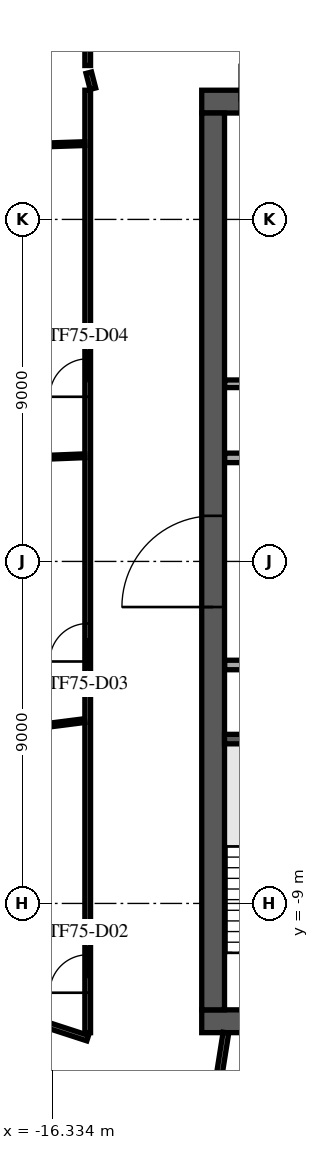
"""IFC4 building model, lengths in metres.
Left out: names, types, materials, properties, quantities, classifications, styles, units other than length and angle.
Written with IfcOpenShell. Run it as: python <this file> out.ifc"""

import sys

from ifc_helpers import new_model, si_unit, direction, frame, frame_2d, origin, place, context, subcontext, project, spatial, rectangle, extrude, element, fill, save


model = new_model("IFC4")
c1 = context("Model", 3, precision=1e-05, world=origin(), true_north=direction((0.0, 1.0)))
c2 = subcontext(c1, "Body", "Model", "MODEL_VIEW")
j1 = project(units=[si_unit("LENGTHUNIT", "METRE"), si_unit("PLANEANGLEUNIT", "RADIAN")], contexts=[c1])
p1 = place(None, origin())
s1 = spatial("IfcSite", under=j1, at=p1, CompositionType="ELEMENT")
p2 = place(p1, origin())
s2 = spatial("IfcBuilding", under=s1, at=p2, CompositionType="ELEMENT")
p3 = place(p2, frame((0.0, 0.0, 316.5)))
s3 = spatial("IfcBuildingStorey", under=s2, at=p3, CompositionType="ELEMENT", Elevation=316.5)
p4 = place(p3, frame((-12.4, 12.1, 0.0), z_axis=(0.0, 0.0, 1.0), x_axis=(1.0, 0.0, 0.0)))
e1 = element("IfcWall", 1, at=p4, inside=s3, PredefinedType="SHEAR", context=c2, shape_type="SweptSolid", body=[
    extrude(rectangle(XDim=24.8, YDim=0.6, at=frame_2d((12.4, 0.0))), origin(), (0.0, 0.0, 1.0), 3.65),
])
p5 = place(p4, frame((11.2, 0.0, 0.0)))
e2 = element("IfcOpeningElement", 2, at=p5, cuts=e1, PredefinedType="OPENING", context=c2, shape_type="SweptSolid", body=[
    extrude(rectangle(XDim=2.4, YDim=2.4, at=frame_2d((1.2, 1.2))), frame((0.0, 0.31, 0.0), z_axis=(0.0, -1.0, 0.0), x_axis=(1.0, 0.0, 0.0)), (0.0, 0.0, 1.0), 0.62),
])
p6 = place(p4, frame((22.025, 0.0, 0.0)))
e3 = element("IfcOpeningElement", 3, at=p6, cuts=e1, PredefinedType="OPENING", context=c2, shape_type="SweptSolid", body=[
    extrude(rectangle(XDim=1.2, YDim=2.1, at=frame_2d((0.6, 1.05))), frame((0.0, 0.31, 0.0), z_axis=(0.0, -1.0, 0.0), x_axis=(1.0, 0.0, 0.0)), (0.0, 0.0, 1.0), 0.62),
])
p7 = place(p4, frame((1.0, 0.0, 0.0)))
e4 = element("IfcOpeningElement", 4, at=p7, cuts=e1, PredefinedType="OPENING", context=c2, shape_type="SweptSolid", body=[
    extrude(rectangle(XDim=1.0, YDim=2.1, at=frame_2d((0.5, 1.05))), frame((0.0, 0.31, 0.0), z_axis=(0.0, -1.0, 0.0), x_axis=(1.0, 0.0, 0.0)), (0.0, 0.0, 1.0), 0.62),
])
p8 = place(p3, frame((-12.4, -12.1, 0.0), z_axis=(0.0, 0.0, 1.0), x_axis=(1.0, 0.0, 0.0)))
e5 = element("IfcWall", 5, at=p8, inside=s3, PredefinedType="SHEAR", context=c2, shape_type="SweptSolid", body=[
    extrude(rectangle(XDim=24.8, YDim=0.6, at=frame_2d((12.4, 0.0))), origin(), (0.0, 0.0, 1.0), 3.65),
])
p9 = place(p8, frame((7.3, 0.0, 0.0)))
e6 = element("IfcOpeningElement", 6, at=p9, cuts=e5, PredefinedType="OPENING", context=c2, shape_type="SweptSolid", body=[
    extrude(rectangle(XDim=2.0, YDim=2.1, at=frame_2d((1.0, 1.05))), frame((0.0, 0.31, 0.0), z_axis=(0.0, -1.0, 0.0), x_axis=(1.0, 0.0, 0.0)), (0.0, 0.0, 1.0), 0.62),
])
p10 = place(p8, frame((17.425, 0.0, 0.0)))
e7 = element("IfcOpeningElement", 7, at=p10, cuts=e5, PredefinedType="OPENING", context=c2, shape_type="SweptSolid", body=[
    extrude(rectangle(XDim=1.2, YDim=2.1, at=frame_2d((0.6, 1.05))), frame((0.0, 0.31, 0.0), z_axis=(0.0, -1.0, 0.0), x_axis=(1.0, 0.0, 0.0)), (0.0, 0.0, 1.0), 0.62),
])
p11 = place(p8, frame((1.575, 0.0, 0.0)))
e8 = element("IfcOpeningElement", 8, at=p11, cuts=e5, PredefinedType="OPENING", context=c2, shape_type="SweptSolid", body=[
    extrude(rectangle(XDim=1.2, YDim=2.1, at=frame_2d((0.6, 1.05))), frame((0.0, 0.31, 0.0), z_axis=(0.0, -1.0, 0.0), x_axis=(1.0, 0.0, 0.0)), (0.0, 0.0, 1.0), 0.62),
])
p12 = place(p8, frame((22.025, 0.0, 0.0)))
e9 = element("IfcOpeningElement", 9, at=p12, cuts=e5, PredefinedType="OPENING", context=c2, shape_type="SweptSolid", body=[
    extrude(rectangle(XDim=1.2, YDim=2.1, at=frame_2d((0.6, 1.05))), frame((0.0, 0.31, 0.0), z_axis=(0.0, -1.0, 0.0), x_axis=(1.0, 0.0, 0.0)), (0.0, 0.0, 1.0), 0.62),
])
p13 = place(p3, frame((-12.1, -11.8, 0.0), z_axis=(0.0, 0.0, 1.0), x_axis=(0.0, 1.0, 0.0)))
e10 = element("IfcWall", 10, at=p13, inside=s3, PredefinedType="SHEAR", context=c2, shape_type="SweptSolid", body=[
    extrude(rectangle(XDim=23.6, YDim=0.6, at=frame_2d((11.8, 0.0))), origin(), (0.0, 0.0, 1.0), 3.65),
])
p14 = place(p13, frame((10.6, 0.0, 0.0)))
e11 = element("IfcOpeningElement", 11, at=p14, cuts=e10, PredefinedType="OPENING", context=c2, shape_type="SweptSolid", body=[
    extrude(rectangle(XDim=2.4, YDim=2.4, at=frame_2d((1.2, 1.2))), frame((0.0, 0.31, 0.0), z_axis=(0.0, -1.0, 0.0), x_axis=(1.0, 0.0, 0.0)), (0.0, 0.0, 1.0), 0.62),
])
p15 = place(p3, frame((-8.65, -4.675, 0.0), z_axis=(0.0, 0.0, 1.0), x_axis=(-1.0, 0.0, 0.0)))
e12 = element("IfcWall", 12, at=p15, inside=s3, PredefinedType="SOLIDWALL", context=c2, shape_type="SweptSolid", body=[
    extrude(rectangle(XDim=3.15, YDim=0.25, at=frame_2d((1.575, 0.0))), origin(), (0.0, 0.0, 1.0), 3.65),
])
p16 = place(p3, frame((-11.795, -2.725, 0.0), z_axis=(0.0, 0.0, 1.0), x_axis=(1.0, 0.0, 0.0)))
e13 = element("IfcWall", 13, at=p16, inside=s3, PredefinedType="PARTITIONING", context=c2, shape_type="SweptSolid", body=[
    extrude(rectangle(XDim=14.415, YDim=0.25, at=frame_2d((7.208, 0.0))), origin(), (0.0, 0.0, 1.0), 3.65),
])
p17 = place(p16, frame((1.295, 0.0, 0.0)))
e14 = element("IfcOpeningElement", 14, at=p17, cuts=e13, PredefinedType="OPENING", context=c2, shape_type="SweptSolid", body=[
    extrude(rectangle(XDim=1.0, YDim=2.1, at=frame_2d((0.5, 1.05))), frame((0.0, 0.135, 0.0), z_axis=(0.0, -1.0, 0.0), x_axis=(1.0, 0.0, 0.0)), (0.0, 0.0, 1.0), 0.27),
])
p18 = place(p16, frame((4.42, 0.0, 0.0)))
e15 = element("IfcOpeningElement", 15, at=p18, cuts=e13, PredefinedType="OPENING", context=c2, shape_type="SweptSolid", body=[
    extrude(rectangle(XDim=1.0, YDim=2.1, at=frame_2d((0.5, 1.05))), frame((0.0, 0.135, 0.0), z_axis=(0.0, -1.0, 0.0), x_axis=(1.0, 0.0, 0.0)), (0.0, 0.0, 1.0), 0.27),
])
p19 = place(p16, frame((9.92, 0.0, 0.0)))
e16 = element("IfcOpeningElement", 16, at=p19, cuts=e13, PredefinedType="OPENING", context=c2, shape_type="SweptSolid", body=[
    extrude(rectangle(XDim=1.0, YDim=2.1, at=frame_2d((0.5, 1.05))), frame((0.0, 0.135, 0.0), z_axis=(0.0, -1.0, 0.0), x_axis=(1.0, 0.0, 0.0)), (0.0, 0.0, 1.0), 0.27),
])
p20 = place(p3, frame((-11.795, 2.725, 0.0), z_axis=(0.0, 0.0, 1.0), x_axis=(1.0, 0.0, 0.0)))
e17 = element("IfcWall", 17, at=p20, inside=s3, PredefinedType="PARTITIONING", context=c2, shape_type="SweptSolid", body=[
    extrude(rectangle(XDim=23.59, YDim=0.25, at=frame_2d((11.795, 0.0))), origin(), (0.0, 0.0, 1.0), 3.65),
])
p21 = place(p20, frame((21.345, 0.0, 0.0)))
e18 = element("IfcOpeningElement", 18, at=p21, cuts=e17, PredefinedType="OPENING", context=c2, shape_type="SweptSolid", body=[
    extrude(rectangle(XDim=0.9, YDim=2.1, at=frame_2d((0.45, 1.05))), frame((0.0, 0.135, 0.0), z_axis=(0.0, -1.0, 0.0), x_axis=(1.0, 0.0, 0.0)), (0.0, 0.0, 1.0), 0.27),
])
p22 = place(p20, frame((1.345, 0.0, 0.0)))
e19 = element("IfcOpeningElement", 19, at=p22, cuts=e17, PredefinedType="OPENING", context=c2, shape_type="SweptSolid", body=[
    extrude(rectangle(XDim=0.9, YDim=2.1, at=frame_2d((0.45, 1.05))), frame((0.0, 0.135, 0.0), z_axis=(0.0, -1.0, 0.0), x_axis=(1.0, 0.0, 0.0)), (0.0, 0.0, 1.0), 0.27),
])
p23 = place(p20, frame((4.42, 0.0, 0.0)))
e20 = element("IfcOpeningElement", 20, at=p23, cuts=e17, PredefinedType="OPENING", context=c2, shape_type="SweptSolid", body=[
    extrude(rectangle(XDim=1.0, YDim=2.1, at=frame_2d((0.5, 1.05))), frame((0.0, 0.135, 0.0), z_axis=(0.0, -1.0, 0.0), x_axis=(1.0, 0.0, 0.0)), (0.0, 0.0, 1.0), 0.27),
])
p24 = place(p20, frame((7.17, 0.0, 0.0)))
e21 = element("IfcOpeningElement", 21, at=p24, cuts=e17, PredefinedType="OPENING", context=c2, shape_type="SweptSolid", body=[
    extrude(rectangle(XDim=1.0, YDim=2.1, at=frame_2d((0.5, 1.05))), frame((0.0, 0.135, 0.0), z_axis=(0.0, -1.0, 0.0), x_axis=(1.0, 0.0, 0.0)), (0.0, 0.0, 1.0), 0.27),
])
p25 = place(p20, frame((12.57, 0.0, 0.0)))
e22 = element("IfcOpeningElement", 22, at=p25, cuts=e17, PredefinedType="OPENING", context=c2, shape_type="SweptSolid", body=[
    extrude(rectangle(XDim=1.2, YDim=2.1, at=frame_2d((0.6, 1.05))), frame((0.0, 0.135, 0.0), z_axis=(0.0, -1.0, 0.0), x_axis=(1.0, 0.0, 0.0)), (0.0, 0.0, 1.0), 0.27),
])
p26 = place(p3, frame((-11.795, 4.675, 0.0), z_axis=(0.0, 0.0, 1.0), x_axis=(1.0, 0.0, 0.0)))
e23 = element("IfcWall", 23, at=p26, inside=s3, PredefinedType="PARTITIONING", context=c2, shape_type="SweptSolid", body=[
    extrude(rectangle(XDim=3.645, YDim=0.2, at=frame_2d((1.823, 0.0))), origin(), (0.0, 0.0, 1.0), 3.65),
])
p27 = place(p3, frame((-22.763, -12.676, 0.0), z_axis=(0.0, 0.0, 1.0), x_axis=(0.951055018443, -0.309021604252, 0.0)))
e24 = element("IfcWall", 24, at=p27, inside=s3, PredefinedType="PARTITIONING", context=c2, shape_type="SweptSolid", body=[
    extrude(rectangle(XDim=35.537, YDim=0.15, at=frame_2d((17.769, 0.0))), origin(), (0.0, 0.0, 1.0), 3.25),
])
p28 = place(p27, frame((0.8, 0.0, 0.0)))
e25 = element("IfcOpeningElement", 25, at=p28, cuts=e24, PredefinedType="OPENING", context=c2, shape_type="SweptSolid", body=[
    extrude(rectangle(XDim=1.8, YDim=2.1, at=frame_2d((0.9, 1.05))), frame((0.0, 0.085, 0.0), z_axis=(0.0, -1.0, 0.0), x_axis=(1.0, 0.0, 0.0)), (0.0, 0.0, 1.0), 0.17),
])
p29 = place(p27, frame((9.098, 0.0, 0.0)))
e26 = element("IfcOpeningElement", 26, at=p29, cuts=e24, PredefinedType="OPENING", context=c2, shape_type="SweptSolid", body=[
    extrude(rectangle(XDim=1.0, YDim=2.1, at=frame_2d((0.5, 1.05))), frame((0.0, 0.085, 0.0), z_axis=(0.0, -1.0, 0.0), x_axis=(1.0, 0.0, 0.0)), (0.0, 0.0, 1.0), 0.17),
])
p30 = place(p27, frame((17.589, 0.0, 0.0)))
e27 = element("IfcOpeningElement", 27, at=p30, cuts=e24, PredefinedType="OPENING", context=c2, shape_type="SweptSolid", body=[
    extrude(rectangle(XDim=1.0, YDim=2.1, at=frame_2d((0.5, 1.05))), frame((0.0, 0.085, 0.0), z_axis=(0.0, -1.0, 0.0), x_axis=(1.0, 0.0, 0.0)), (0.0, 0.0, 1.0), 0.17),
])
p31 = place(p27, frame((27.473, 0.0, 0.0)))
e28 = element("IfcOpeningElement", 28, at=p31, cuts=e24, PredefinedType="OPENING", context=c2, shape_type="SweptSolid", body=[
    extrude(rectangle(XDim=1.0, YDim=2.1, at=frame_2d((0.5, 1.05))), frame((0.0, 0.085, 0.0), z_axis=(0.0, -1.0, 0.0), x_axis=(1.0, 0.0, 0.0)), (0.0, 0.0, 1.0), 0.17),
])
p32 = place(p27, frame((30.83, 0.0, 0.0)))
e29 = element("IfcOpeningElement", 29, at=p32, cuts=e24, PredefinedType="OPENING", context=c2, shape_type="SweptSolid", body=[
    extrude(rectangle(XDim=1.8, YDim=2.1, at=frame_2d((0.9, 1.05))), frame((0.0, 0.085, 0.0), z_axis=(0.0, -1.0, 0.0), x_axis=(1.0, 0.0, 0.0)), (0.0, 0.0, 1.0), 0.17),
])
p33 = place(p3, frame((-22.021, -10.394, 0.0), z_axis=(0.0, 0.0, 1.0), x_axis=(0.951082252119, -0.308937776427, 0.0)))
e30 = element("IfcWall", 30, at=p33, inside=s3, PredefinedType="PARTITIONING", context=c2, shape_type="SweptSolid", body=[
    extrude(rectangle(XDim=6.961, YDim=0.15, at=frame_2d((3.481, 0.0))), origin(), (0.0, 0.0, 1.0), 3.25),
])
p34 = place(p3, frame((-15.4, -12.4, 0.0), z_axis=(0.0, 0.0, 1.0), x_axis=(0.0, 1.0, 0.0)))
e31 = element("IfcWall", 31, at=p34, inside=s3, PredefinedType="PARTITIONING", context=c2, shape_type="SweptSolid", body=[
    extrude(rectangle(XDim=24.8, YDim=0.15, at=frame_2d((12.4, 0.0))), origin(), (0.0, 0.0, 1.0), 3.25),
])
p35 = place(p34, frame((1.05, 0.0, 0.0)))
e32 = element("IfcOpeningElement", 32, at=p35, cuts=e31, PredefinedType="OPENING", context=c2, shape_type="SweptSolid", body=[
    extrude(rectangle(XDim=1.0, YDim=2.1, at=frame_2d((0.5, 1.05))), frame((0.0, 0.085, 0.0), z_axis=(0.0, -1.0, 0.0), x_axis=(1.0, 0.0, 0.0)), (0.0, 0.0, 1.0), 0.17),
])
p36 = place(p34, frame((9.767, 0.0, 0.0)))
e33 = element("IfcOpeningElement", 33, at=p36, cuts=e31, PredefinedType="OPENING", context=c2, shape_type="SweptSolid", body=[
    extrude(rectangle(XDim=1.0, YDim=2.1, at=frame_2d((0.5, 1.05))), frame((0.0, 0.085, 0.0), z_axis=(0.0, -1.0, 0.0), x_axis=(1.0, 0.0, 0.0)), (0.0, 0.0, 1.0), 0.17),
])
p37 = place(p34, frame((16.733, 0.0, 0.0)))
e34 = element("IfcOpeningElement", 34, at=p37, cuts=e31, PredefinedType="OPENING", context=c2, shape_type="SweptSolid", body=[
    extrude(rectangle(XDim=1.0, YDim=2.1, at=frame_2d((0.5, 1.05))), frame((0.0, 0.085, 0.0), z_axis=(0.0, -1.0, 0.0), x_axis=(1.0, 0.0, 0.0)), (0.0, 0.0, 1.0), 0.17),
])
p38 = place(p3, frame((-15.4, 13.05, 0.0), z_axis=(0.0, 0.0, 1.0), x_axis=(0.0, 1.0, 0.0)))
e35 = element("IfcWall", 35, at=p38, inside=s3, PredefinedType="PARTITIONING", context=c2, shape_type="SweptSolid", body=[
    extrude(rectangle(XDim=1.7, YDim=0.15, at=frame_2d((0.85, 0.0))), origin(), (0.0, 0.0, 1.0), 3.25),
])
p39 = place(p3, frame((-15.263, 12.44, 0.0), z_axis=(0.0, 0.0, 1.0), x_axis=(-0.249928977064, 0.968264171817, 0.0)))
e36 = element("IfcWall", 36, at=p39, inside=s3, PredefinedType="PARTITIONING", context=c2, shape_type="SweptSolid", body=[
    extrude(rectangle(XDim=0.435, YDim=0.15, at=frame_2d((0.217, 0.0))), origin(), (0.0, 0.0, 1.0), 3.25),
])
p40 = place(p3, frame((-11.949, -13.575, 0.0), z_axis=(0.0, 0.0, 1.0), x_axis=(0.156542003239, 0.987671302216, 0.0)))
e37 = element("IfcWall", 37, at=p40, inside=s3, PredefinedType="PARTITIONING", context=c2, shape_type="SweptSolid", body=[
    extrude(rectangle(XDim=1.19, YDim=0.15, at=frame_2d((0.595, 0.0))), origin(), (0.0, 0.0, 1.0), 3.25),
])
p41 = place(p3, frame((-27.279, -5.694, 0.0), z_axis=(0.0, 0.0, 1.0), x_axis=(0.991957239154, 0.126573439907, 0.0)))
e38 = element("IfcWall", 38, at=p41, inside=s3, PredefinedType="PARTITIONING", context=c2, shape_type="SweptSolid", body=[
    extrude(rectangle(XDim=11.893, YDim=0.1, at=frame_2d((5.947, 0.0))), origin(), (0.0, 0.0, 1.0), 3.13),
])
p42 = place(p3, frame((-27.002, 2.323, 0.0), z_axis=(0.0, 0.0, 1.0), x_axis=(0.999209591443, 0.039751633537, 0.0)))
e39 = element("IfcWall", 39, at=p42, inside=s3, PredefinedType="PARTITIONING", context=c2, shape_type="SweptSolid", body=[
    extrude(rectangle(XDim=11.534, YDim=0.1, at=frame_2d((5.767, 0.0))), origin(), (0.0, 0.0, 1.0), 3.05),
])
p43 = place(p3, frame((-24.279, 10.703, 0.0), z_axis=(0.0, 0.0, 1.0), x_axis=(0.999452969423, 0.033072071465, 0.0)))
e40 = element("IfcWall", 40, at=p43, inside=s3, PredefinedType="PARTITIONING", context=c2, shape_type="SweptSolid", body=[
    extrude(rectangle(XDim=8.807, YDim=0.1, at=frame_2d((4.403, 0.0))), origin(), (0.0, 0.0, 1.0), 3.05),
])
p44 = place(p14, origin())
e41 = element("IfcDoor", 41, at=p44, inside=s3, OperationType="SINGLE_SWING_LEFT", PredefinedType="DOOR", context=c2, shape_type="SweptSolid", body=[
    extrude(rectangle(XDim=2.4, YDim=2.4, at=frame_2d((1.2, 1.2))), frame((0.0, 0.025, 0.0), z_axis=(0.0, -1.0, 0.0), x_axis=(1.0, 0.0, 0.0)), (0.0, 0.0, 1.0), 0.05),
])
fill(e11, e41)
p45 = place(p35, origin())
e42 = element("IfcDoor", 42, at=p45, inside=s3, OperationType="SINGLE_SWING_LEFT", PredefinedType="DOOR", context=c2, shape_type="SweptSolid", body=[
    extrude(rectangle(XDim=1.0, YDim=2.1, at=frame_2d((0.5, 1.05))), frame((0.0, 0.025, 0.0), z_axis=(0.0, -1.0, 0.0), x_axis=(1.0, 0.0, 0.0)), (0.0, 0.0, 1.0), 0.05),
])
fill(e32, e42)
p46 = place(p36, origin())
e43 = element("IfcDoor", 43, at=p46, inside=s3, OperationType="SINGLE_SWING_LEFT", PredefinedType="DOOR", context=c2, shape_type="SweptSolid", body=[
    extrude(rectangle(XDim=1.0, YDim=2.1, at=frame_2d((0.5, 1.05))), frame((0.0, 0.025, 0.0), z_axis=(0.0, -1.0, 0.0), x_axis=(1.0, 0.0, 0.0)), (0.0, 0.0, 1.0), 0.05),
])
fill(e33, e43)
p47 = place(p37, origin())
e44 = element("IfcDoor", 44, at=p47, inside=s3, OperationType="SINGLE_SWING_LEFT", PredefinedType="DOOR", context=c2, shape_type="SweptSolid", body=[
    extrude(rectangle(XDim=1.0, YDim=2.1, at=frame_2d((0.5, 1.05))), frame((0.0, 0.025, 0.0), z_axis=(0.0, -1.0, 0.0), x_axis=(1.0, 0.0, 0.0)), (0.0, 0.0, 1.0), 0.05),
])
fill(e34, e44)
save(model, sys.argv[1])
